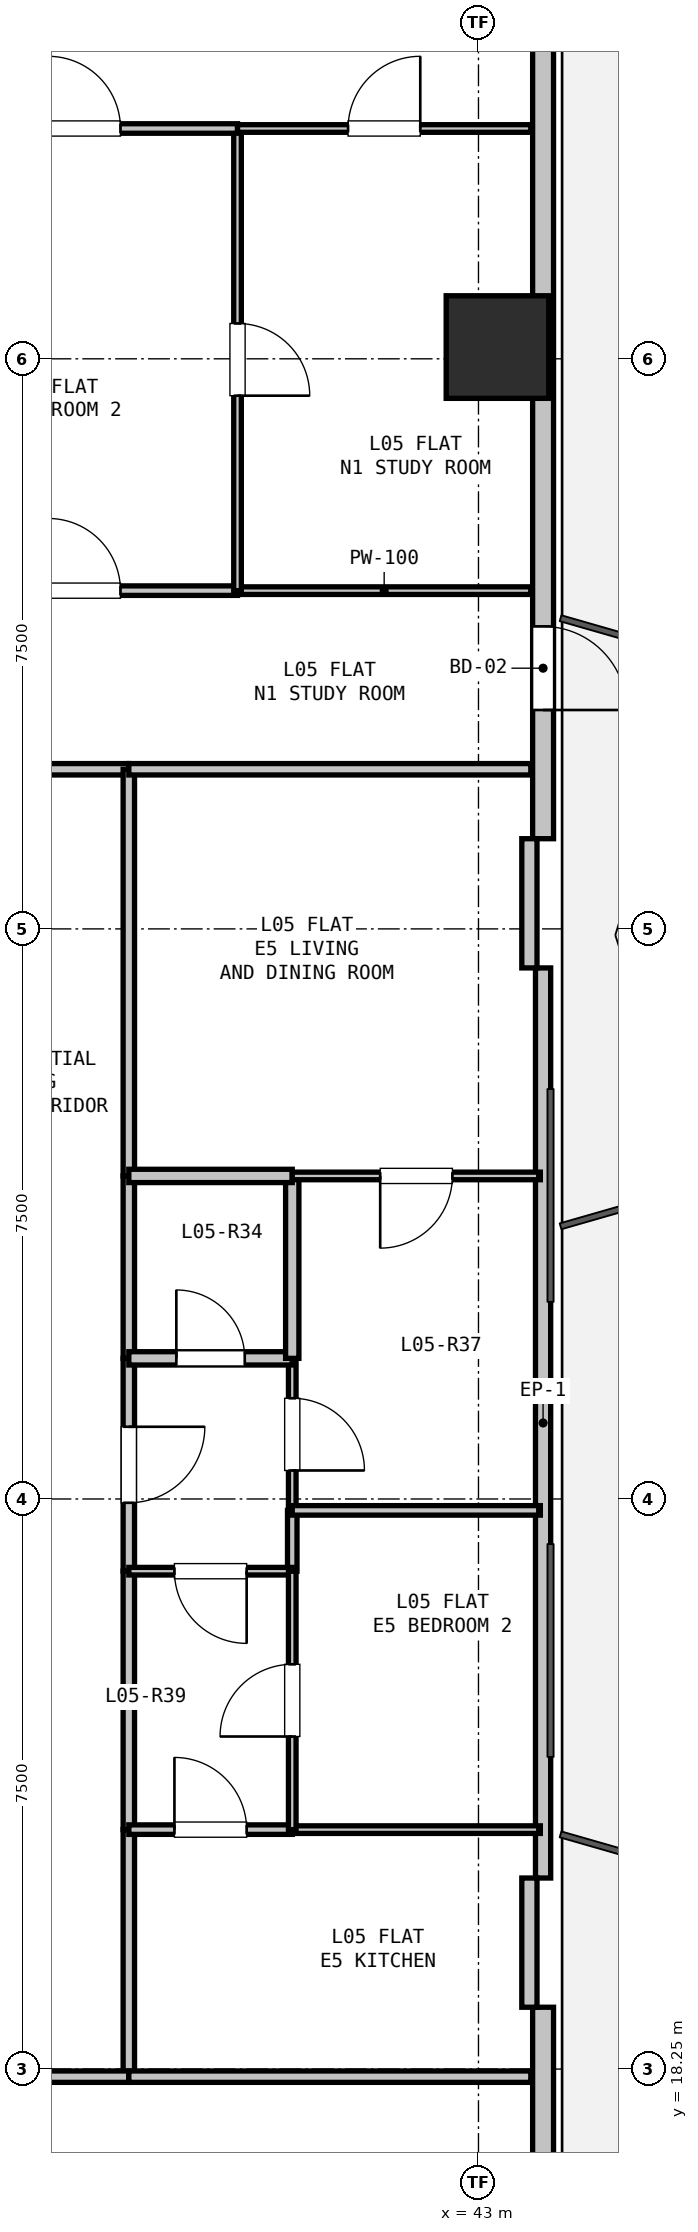
"""IFC4 building model, lengths in metres.
Left out: names, types, materials, properties, quantities, classifications, styles, units other than length and angle.
Written with IfcOpenShell. Run it as: python <this file> out.ifc"""

import sys

from ifc_helpers import new_model, si_unit, direction, frame, frame_2d, origin, origin_2d, place, context, subcontext, project, spatial, rectangle, hollow_rectangle, extrude, element, fill, save


model = new_model("IFC4")
c1 = context("Model", 3, precision=1e-05, world=origin(), true_north=direction((0.0, 1.0)))
c2 = subcontext(c1, "Body", "Model", "MODEL_VIEW")
j1 = project(units=[si_unit("LENGTHUNIT", "METRE"), si_unit("PLANEANGLEUNIT", "RADIAN")], contexts=[c1])
p1 = place(None, origin())
s1 = spatial("IfcSite", under=j1, at=p1, CompositionType="ELEMENT")
p2 = place(p1, origin())
s2 = spatial("IfcBuilding", under=s1, at=p2, CompositionType="ELEMENT")
p3 = place(p2, frame((0.0, 0.0, 22.5)))
s3 = spatial("IfcBuildingStorey", under=s2, at=p3, CompositionType="ELEMENT", Elevation=22.5)
p4 = place(p3, frame((43.25, 40.905, 0.0), z_axis=(0.0, 0.0, 1.0), x_axis=(1.0, 0.0, 0.0)))
e1 = element("IfcColumn", 1, at=p4, inside=s3, PredefinedType="COLUMN", context=c2, shape_type="SweptSolid", body=[
    extrude(hollow_rectangle(XDim=1.35, YDim=1.35, WallThickness=0.036, at=origin_2d()), origin(), (0.0, 0.0, 1.0), 3.3),
])
p5 = place(p3, frame((28.232, 43.454, 0.0), z_axis=(0.0, 0.0, 1.0), x_axis=(0.86603192154, 0.499988710747, 0.0)))
e2 = element("IfcWall", 2, at=p5, inside=s3, PredefinedType="SOLIDWALL", context=c2, shape_type="SweptSolid", body=[
    extrude(rectangle(XDim=12.673, YDim=0.275, at=frame_2d((6.336, 0.0))), origin(), (0.0, 0.0, 1.0), 2.66),
])
p6 = place(p5, frame((4.68, 0.0, 0.9)))
e3 = element("IfcOpeningElement", 3, at=p6, cuts=e2, PredefinedType="OPENING", context=c2, shape_type="SweptSolid", body=[
    extrude(rectangle(XDim=1.2, YDim=1.4, at=frame_2d((0.6, 0.7))), frame((0.0, 0.147, 0.0), z_axis=(0.0, -1.0, 0.0), x_axis=(1.0, 0.0, 0.0)), (0.0, 0.0, 1.0), 0.295),
])
p7 = place(p3, frame((43.85, 47.11, 0.0), z_axis=(0.0, 0.0, 1.0), x_axis=(0.0, -1.0, 0.0)))
e4 = element("IfcWall", 4, at=p7, inside=s3, PredefinedType="SOLIDWALL", context=c2, shape_type="SweptSolid", body=[
    extrude(rectangle(XDim=12.673, YDim=0.275, at=frame_2d((6.336, 0.0))), origin(), (0.0, 0.0, 1.0), 2.66),
])
p8 = place(p7, frame((9.88, 0.0, 0.0)))
e5 = element("IfcOpeningElement", 5, at=p8, cuts=e4, PredefinedType="OPENING", context=c2, shape_type="SweptSolid", body=[
    extrude(rectangle(XDim=1.1, YDim=2.1, at=frame_2d((0.55, 1.05))), frame((0.0, 0.147, 0.0), z_axis=(0.0, -1.0, 0.0), x_axis=(1.0, 0.0, 0.0)), (0.0, 0.0, 1.0), 0.295),
])
p9 = place(p3, frame((43.85, 32.737, 0.0), z_axis=(0.0, 0.0, 1.0), x_axis=(0.0, -1.0, 0.0)))
e6 = element("IfcWall", 6, at=p9, inside=s3, PredefinedType="PARAPET", context=c2, shape_type="SweptSolid", body=[
    extrude(rectangle(XDim=11.973, YDim=0.2, at=frame_2d((5.987, 0.0))), origin(), (0.0, 0.0, 1.0), 0.2),
])
p10 = place(p3, frame((43.85, 19.063, 0.0), z_axis=(0.0, 0.0, 1.0), x_axis=(0.0, -1.0, 0.0)))
e7 = element("IfcWall", 7, at=p10, inside=s3, PredefinedType="SOLIDWALL", context=c2, shape_type="SweptSolid", body=[
    extrude(rectangle(XDim=12.673, YDim=0.275, at=frame_2d((6.336, 0.0))), origin(), (0.0, 0.0, 1.0), 2.66),
])
for number, where, z_axis, x_axis in (
    (8, (43.67, 34.437, 0.0), (0.0, 0.0, 1.0), (0.0, -1.0, 0.0)),
    (9, (43.67, 20.763, 0.0), (0.0, 0.0, 1.0), (0.0, -1.0, 0.0)),
):
    element("IfcWall", number, at=place(p3, frame(where, z_axis=z_axis, x_axis=x_axis)), inside=s3, PredefinedType="PARAPET", context=c2, shape_type="SweptSolid", body=[
        extrude(rectangle(XDim=1.7, YDim=0.2, at=frame_2d((0.85, 0.0))), origin(), (0.0, 0.0, 1.0), 2.66),
    ])
p11 = place(p3, frame((35.8, 35.35, 0.0), z_axis=(0.0, 0.0, 1.0), x_axis=(1.0, 0.0, 0.0)))
e10 = element("IfcWall", 10, at=p11, inside=s3, PredefinedType="PARTITIONING", context=c2, shape_type="SweptSolid", body=[
    extrude(rectangle(XDim=2.6, YDim=0.15, at=frame_2d((1.3, 0.0))), origin(), (0.0, 0.0, 1.0), 2.337),
])
p12 = place(p3, frame((38.4, 35.35, 0.0), z_axis=(0.0, 0.0, 1.0), x_axis=(0.0, -1.0, 0.0)))
e11 = element("IfcWall", 11, at=p12, inside=s3, PredefinedType="PARTITIONING", context=c2, shape_type="SweptSolid", body=[
    extrude(rectangle(XDim=5.35, YDim=0.15, at=frame_2d((2.675, 0.0))), origin(), (0.0, 0.0, 1.0), 2.337),
])
p13 = place(p3, frame((38.4, 30.0, 0.0), z_axis=(0.0, 0.0, 1.0), x_axis=(0.0, -1.0, 0.0)))
e12 = element("IfcWall", 12, at=p13, inside=s3, PredefinedType="PARTITIONING", context=c2, shape_type="SweptSolid", body=[
    extrude(rectangle(XDim=2.4, YDim=0.15, at=frame_2d((1.2, 0.0))), origin(), (0.0, 0.0, 1.0), 3.04),
])
p14 = place(p3, frame((38.4, 27.6, 0.0), z_axis=(0.0, 0.0, 1.0), x_axis=(0.0, -1.0, 0.0)))
e13 = element("IfcWall", 13, at=p14, inside=s3, PredefinedType="PARTITIONING", context=c2, shape_type="SweptSolid", body=[
    extrude(rectangle(XDim=2.8, YDim=0.15, at=frame_2d((1.4, 0.0))), origin(), (0.0, 0.0, 1.0), 3.04),
])
p15 = place(p14, frame((0.9, 0.0, 0.0)))
e14 = element("IfcOpeningElement", 14, at=p15, cuts=e13, PredefinedType="OPENING", context=c2, shape_type="SweptSolid", body=[
    extrude(rectangle(XDim=1.0, YDim=2.15, at=frame_2d((0.5, 1.075))), frame((0.0, 0.085, 0.0), z_axis=(0.0, -1.0, 0.0), x_axis=(1.0, 0.0, 0.0)), (0.0, 0.0, 1.0), 0.17),
])
p16 = place(p3, frame((38.4, 24.8, 0.0), z_axis=(0.0, 0.0, 1.0), x_axis=(0.0, -1.0, 0.0)))
e15 = element("IfcWall", 15, at=p16, inside=s3, PredefinedType="PARTITIONING", context=c2, shape_type="SweptSolid", body=[
    extrude(rectangle(XDim=3.4, YDim=0.15, at=frame_2d((1.7, 0.0))), origin(), (0.0, 0.0, 1.0), 3.04),
])
p17 = place(p3, frame((38.4, 21.4, 0.0), z_axis=(0.0, 0.0, 1.0), x_axis=(0.0, -1.0, 0.0)))
e16 = element("IfcWall", 16, at=p17, inside=s3, PredefinedType="PARTITIONING", context=c2, shape_type="SweptSolid", body=[
    extrude(rectangle(XDim=3.25, YDim=0.15, at=frame_2d((1.625, 0.0))), origin(), (0.0, 0.0, 1.0), 3.04),
])
p18 = place(p3, frame((38.4, 18.15, 0.0), z_axis=(0.0, 0.0, 1.0), x_axis=(-1.0, 0.0, 0.0)))
e17 = element("IfcWall", 17, at=p18, inside=s3, PredefinedType="PARTITIONING", context=c2, shape_type="SweptSolid", body=[
    extrude(rectangle(XDim=2.6, YDim=0.15, at=frame_2d((1.3, 0.0))), origin(), (0.0, 0.0, 1.0), 2.337),
])
p19 = place(p3, frame((40.55, 27.6, 0.0), z_axis=(0.0, 0.0, 1.0), x_axis=(0.0, -1.0, 0.0)))
e18 = element("IfcWall", 18, at=p19, inside=s3, PredefinedType="PARTITIONING", context=c2, shape_type="SweptSolid", body=[
    extrude(rectangle(XDim=2.0, YDim=0.1, at=frame_2d((1.0, 0.0))), origin(), (0.0, 0.0, 1.0), 3.04),
])
p20 = place(p19, frame((0.525, 0.0, 0.0)))
e19 = element("IfcOpeningElement", 19, at=p20, cuts=e18, PredefinedType="OPENING", context=c2, shape_type="SweptSolid", body=[
    extrude(rectangle(XDim=0.95, YDim=2.1, at=frame_2d((0.475, 1.05))), frame((0.0, 0.06, 0.0), z_axis=(0.0, -1.0, 0.0), x_axis=(1.0, 0.0, 0.0)), (0.0, 0.0, 1.0), 0.12),
])
p21 = place(p3, frame((40.55, 25.6, 0.0), z_axis=(0.0, 0.0, 1.0), x_axis=(0.0, -1.0, 0.0)))
e20 = element("IfcWall", 20, at=p21, inside=s3, PredefinedType="PARTITIONING", context=c2, shape_type="SweptSolid", body=[
    extrude(rectangle(XDim=0.8, YDim=0.125, at=frame_2d((0.4, 0.0))), origin(), (0.0, 0.0, 1.0), 3.04),
])
p22 = place(p3, frame((40.55, 24.8, 0.0), z_axis=(0.0, 0.0, 1.0), x_axis=(-1.0, 0.0, 0.0)))
e21 = element("IfcWall", 21, at=p22, inside=s3, PredefinedType="PARTITIONING", context=c2, shape_type="SweptSolid", body=[
    extrude(rectangle(XDim=2.15, YDim=0.1, at=frame_2d((1.075, 0.0))), origin(), (0.0, 0.0, 1.0), 3.04),
])
p23 = place(p22, frame((0.6, 0.0, 0.0)))
e22 = element("IfcOpeningElement", 22, at=p23, cuts=e21, PredefinedType="OPENING", context=c2, shape_type="SweptSolid", body=[
    extrude(rectangle(XDim=0.95, YDim=2.1, at=frame_2d((0.475, 1.05))), frame((0.0, 0.06, 0.0), z_axis=(0.0, -1.0, 0.0), x_axis=(1.0, 0.0, 0.0)), (0.0, 0.0, 1.0), 0.12),
])
p24 = place(p3, frame((38.4, 27.6, 0.0), z_axis=(0.0, 0.0, 1.0), x_axis=(1.0, 0.0, 0.0)))
e23 = element("IfcWall", 23, at=p24, inside=s3, PredefinedType="PLUMBINGWALL", context=c2, shape_type="SweptSolid", body=[
    extrude(rectangle(XDim=2.15, YDim=0.175, at=frame_2d((1.075, 0.0))), origin(), (0.0, 0.0, 1.0), 3.04),
])
p25 = place(p24, frame((0.625, 0.0, 0.0)))
e24 = element("IfcOpeningElement", 24, at=p25, cuts=e23, PredefinedType="OPENING", context=c2, shape_type="SweptSolid", body=[
    extrude(rectangle(XDim=0.9, YDim=2.1, at=frame_2d((0.45, 1.05))), frame((0.0, 0.097, 0.0), z_axis=(0.0, -1.0, 0.0), x_axis=(1.0, 0.0, 0.0)), (0.0, 0.0, 1.0), 0.195),
])
p26 = place(p3, frame((38.4, 18.15, 0.0), z_axis=(0.0, 0.0, 1.0), x_axis=(1.0, 0.0, 0.0)))
e25 = element("IfcWall", 25, at=p26, inside=s3, PredefinedType="PARTITIONING", context=c2, shape_type="SweptSolid", body=[
    extrude(rectangle(XDim=5.289, YDim=0.15, at=frame_2d((2.644, 0.0))), origin(), (0.0, 0.0, 1.0), 2.365),
])
p27 = place(p3, frame((40.55, 30.0, 0.0), z_axis=(0.0, 0.0, 1.0), x_axis=(0.0, -1.0, 0.0)))
e26 = element("IfcWall", 26, at=p27, inside=s3, PredefinedType="PLUMBINGWALL", context=c2, shape_type="SweptSolid", body=[
    extrude(rectangle(XDim=2.4, YDim=0.175, at=frame_2d((1.2, 0.0))), origin(), (0.0, 0.0, 1.0), 3.04),
])
p28 = place(p3, frame((38.4, 30.0, 0.0), z_axis=(0.0, 0.0, 1.0), x_axis=(1.0, 0.0, 0.0)))
e27 = element("IfcWall", 27, at=p28, inside=s3, PredefinedType="PLUMBINGWALL", context=c2, shape_type="SweptSolid", body=[
    extrude(rectangle(XDim=2.15, YDim=0.175, at=frame_2d((1.075, 0.0))), origin(), (0.0, 0.0, 1.0), 3.04),
])
p29 = place(p3, frame((38.4, 21.4, 0.0), z_axis=(0.0, 0.0, 1.0), x_axis=(1.0, 0.0, 0.0)))
e28 = element("IfcWall", 28, at=p29, inside=s3, PredefinedType="PARTITIONING", context=c2, shape_type="SweptSolid", body=[
    extrude(rectangle(XDim=2.15, YDim=0.125, at=frame_2d((1.075, 0.0))), origin(), (0.0, 0.0, 1.0), 3.04),
])
p30 = place(p29, frame((0.6, 0.0, 0.0)))
e29 = element("IfcOpeningElement", 29, at=p30, cuts=e28, PredefinedType="OPENING", context=c2, shape_type="SweptSolid", body=[
    extrude(rectangle(XDim=0.95, YDim=2.1, at=frame_2d((0.475, 1.05))), frame((0.0, 0.073, 0.0), z_axis=(0.0, -1.0, 0.0), x_axis=(1.0, 0.0, 0.0)), (0.0, 0.0, 1.0), 0.145),
])
p31 = place(p3, frame((40.55, 21.4, 0.0), z_axis=(0.0, 0.0, 1.0), x_axis=(1.0, 0.0, 0.0)))
e30 = element("IfcWall", 30, at=p31, inside=s3, PredefinedType="PARTITIONING", context=c2, shape_type="SweptSolid", body=[
    extrude(rectangle(XDim=3.264, YDim=0.1, at=frame_2d((1.632, 0.0))), origin(), (0.0, 0.0, 1.0), 2.365),
])
p32 = place(p3, frame((43.688, 35.35, 0.0), z_axis=(0.0, 0.0, 1.0), x_axis=(-1.0, 0.0, 0.0)))
e31 = element("IfcWall", 31, at=p32, inside=s3, PredefinedType="PARTITIONING", context=c2, shape_type="SweptSolid", body=[
    extrude(rectangle(XDim=5.289, YDim=0.15, at=frame_2d((2.644, 0.0))), origin(), (0.0, 0.0, 1.0), 2.337),
])
p33 = place(p3, frame((35.8, 37.7, 0.0), z_axis=(0.0, 0.0, 1.0), x_axis=(1.0, 0.0, 0.0)))
e32 = element("IfcWall", 32, at=p33, inside=s3, PredefinedType="PARTITIONING", context=c2, shape_type="SweptSolid", body=[
    extrude(rectangle(XDim=4.03, YDim=0.125, at=frame_2d((2.015, 0.0))), origin(), (0.0, 0.0, 1.0), 2.337),
])
p34 = place(p33, frame((1.54, 0.0, 0.0)))
e33 = element("IfcOpeningElement", 33, at=p34, cuts=e32, PredefinedType="OPENING", context=c2, shape_type="SweptSolid", body=[
    extrude(rectangle(XDim=0.95, YDim=2.1, at=frame_2d((0.475, 1.05))), frame((0.0, 0.073, 0.0), z_axis=(0.0, -1.0, 0.0), x_axis=(1.0, 0.0, 0.0)), (0.0, 0.0, 1.0), 0.145),
])
p35 = place(p3, frame((39.83, 37.7, 0.0), z_axis=(0.0, 0.0, 1.0), x_axis=(1.0, 0.0, 0.0)))
e34 = element("IfcWall", 34, at=p35, inside=s3, PredefinedType="PARTITIONING", context=c2, shape_type="SweptSolid", body=[
    extrude(rectangle(XDim=3.858, YDim=0.1, at=frame_2d((1.929, 0.0))), origin(), (0.0, 0.0, 1.0), 2.337),
])
p36 = place(p3, frame((39.83, 43.78, 0.0), z_axis=(0.0, 0.0, 1.0), x_axis=(0.0, -1.0, 0.0)))
e35 = element("IfcWall", 35, at=p36, inside=s3, PredefinedType="PARTITIONING", context=c2, shape_type="SweptSolid", body=[
    extrude(rectangle(XDim=6.08, YDim=0.1, at=frame_2d((3.04, 0.0))), origin(), (0.0, 0.0, 1.0), 3.04),
])
p37 = place(p36, frame((2.565, 0.0, 0.0)))
e36 = element("IfcOpeningElement", 36, at=p37, cuts=e35, PredefinedType="OPENING", context=c2, shape_type="SweptSolid", body=[
    extrude(rectangle(XDim=0.95, YDim=2.1, at=frame_2d((0.475, 1.05))), frame((0.0, 0.06, 0.0), z_axis=(0.0, -1.0, 0.0), x_axis=(1.0, 0.0, 0.0)), (0.0, 0.0, 1.0), 0.12),
])
p38 = place(p3, frame((35.8, 43.78, 0.0), z_axis=(0.0, 0.0, 1.0), x_axis=(1.0, 0.0, 0.0)))
e37 = element("IfcWall", 37, at=p38, inside=s3, PredefinedType="PARTITIONING", context=c2, shape_type="SweptSolid", body=[
    extrude(rectangle(XDim=4.03, YDim=0.125, at=frame_2d((2.015, 0.0))), origin(), (0.0, 0.0, 1.0), 2.337),
])
p39 = place(p38, frame((1.54, 0.0, 0.0)))
e38 = element("IfcOpeningElement", 38, at=p39, cuts=e37, PredefinedType="OPENING", context=c2, shape_type="SweptSolid", body=[
    extrude(rectangle(XDim=0.95, YDim=2.1, at=frame_2d((0.475, 1.05))), frame((0.0, 0.073, 0.0), z_axis=(0.0, -1.0, 0.0), x_axis=(1.0, 0.0, 0.0)), (0.0, 0.0, 1.0), 0.145),
])
p40 = place(p3, frame((39.83, 43.78, 0.0), z_axis=(0.0, 0.0, 1.0), x_axis=(1.0, 0.0, 0.0)))
e39 = element("IfcWall", 39, at=p40, inside=s3, PredefinedType="PARTITIONING", context=c2, shape_type="SweptSolid", body=[
    extrude(rectangle(XDim=3.858, YDim=0.1, at=frame_2d((1.929, 0.0))), origin(), (0.0, 0.0, 1.0), 2.65),
])
p41 = place(p40, frame((1.454, 0.0, 0.0)))
e40 = element("IfcOpeningElement", 40, at=p41, cuts=e39, PredefinedType="OPENING", context=c2, shape_type="SweptSolid", body=[
    extrude(rectangle(XDim=0.95, YDim=2.1, at=frame_2d((0.475, 1.05))), frame((0.0, 0.06, 0.0), z_axis=(0.0, -1.0, 0.0), x_axis=(1.0, 0.0, 0.0)), (0.0, 0.0, 1.0), 0.12),
])
p42 = place(p3, frame((43.814, 30.0, 0.0), z_axis=(0.0, 0.0, 1.0), x_axis=(-1.0, 0.0, 0.0)))
e41 = element("IfcWall", 41, at=p42, inside=s3, PredefinedType="PARTITIONING", context=c2, shape_type="SweptSolid", body=[
    extrude(rectangle(XDim=3.264, YDim=0.1, at=frame_2d((1.632, 0.0))), origin(), (0.0, 0.0, 1.0), 2.365),
])
p43 = place(p42, frame((1.157, 0.0, 0.0)))
e42 = element("IfcOpeningElement", 42, at=p43, cuts=e41, PredefinedType="OPENING", context=c2, shape_type="SweptSolid", body=[
    extrude(rectangle(XDim=0.95, YDim=2.1, at=frame_2d((0.475, 1.05))), frame((0.0, 0.06, 0.0), z_axis=(0.0, -1.0, 0.0), x_axis=(1.0, 0.0, 0.0)), (0.0, 0.0, 1.0), 0.12),
])
p44 = place(p3, frame((43.814, 25.6, 0.0), z_axis=(0.0, 0.0, 1.0), x_axis=(-1.0, 0.0, 0.0)))
e43 = element("IfcWall", 43, at=p44, inside=s3, PredefinedType="PARTITIONING", context=c2, shape_type="SweptSolid", body=[
    extrude(rectangle(XDim=3.264, YDim=0.125, at=frame_2d((1.632, 0.0))), origin(), (0.0, 0.0, 1.0), 2.365),
])
p45 = place(p3, frame((40.55, 21.4, 0.0), z_axis=(0.0, 0.0, 1.0), x_axis=(0.0, 1.0, 0.0)))
e44 = element("IfcWall", 44, at=p45, inside=s3, PredefinedType="PARTITIONING", context=c2, shape_type="SweptSolid", body=[
    extrude(rectangle(XDim=3.4, YDim=0.1, at=frame_2d((1.7, 0.0))), origin(), (0.0, 0.0, 1.0), 3.04),
])
p46 = place(p45, frame((1.225, 0.0, 0.0)))
e45 = element("IfcOpeningElement", 45, at=p46, cuts=e44, PredefinedType="OPENING", context=c2, shape_type="SweptSolid", body=[
    extrude(rectangle(XDim=0.95, YDim=2.1, at=frame_2d((0.475, 1.05))), frame((0.0, 0.06, 0.0), z_axis=(0.0, -1.0, 0.0), x_axis=(1.0, 0.0, 0.0)), (0.0, 0.0, 1.0), 0.12),
])
p47 = place(p8, origin())
e46 = element("IfcDoor", 46, at=p47, inside=s3, OperationType="SINGLE_SWING_RIGHT", PredefinedType="DOOR", context=c2, shape_type="SweptSolid", body=[
    extrude(rectangle(XDim=1.1, YDim=2.1, at=frame_2d((0.55, 1.05))), frame((0.0, 0.025, 0.0), z_axis=(0.0, -1.0, 0.0), x_axis=(1.0, 0.0, 0.0)), (0.0, 0.0, 1.0), 0.05),
])
fill(e5, e46)
p48 = place(p15, origin())
e47 = element("IfcDoor", 47, at=p48, inside=s3, OperationType="SINGLE_SWING_LEFT", PredefinedType="DOOR", context=c2, shape_type="SweptSolid", body=[
    extrude(rectangle(XDim=1.0, YDim=2.15, at=frame_2d((0.5, 1.075))), frame((0.0, 0.025, 0.0), z_axis=(0.0, -1.0, 0.0), x_axis=(1.0, 0.0, 0.0)), (0.0, 0.0, 1.0), 0.05),
])
fill(e14, e47)
p49 = place(p25, origin())
e48 = element("IfcDoor", 48, at=p49, inside=s3, OperationType="SINGLE_SWING_LEFT", PredefinedType="DOOR", context=c2, shape_type="SweptSolid", body=[
    extrude(rectangle(XDim=0.9, YDim=2.1, at=frame_2d((0.45, 1.05))), frame((0.0, 0.025, 0.0), z_axis=(0.0, -1.0, 0.0), x_axis=(1.0, 0.0, 0.0)), (0.0, 0.0, 1.0), 0.05),
])
fill(e24, e48)
p50 = place(p20, origin())
e49 = element("IfcDoor", 49, at=p50, inside=s3, OperationType="SINGLE_SWING_RIGHT", PredefinedType="DOOR", context=c2, shape_type="SweptSolid", body=[
    extrude(rectangle(XDim=0.95, YDim=2.1, at=frame_2d((0.475, 1.05))), frame((0.0, 0.025, 0.0), z_axis=(0.0, -1.0, 0.0), x_axis=(1.0, 0.0, 0.0)), (0.0, 0.0, 1.0), 0.05),
])
fill(e19, e49)
p51 = place(p23, origin())
e50 = element("IfcDoor", 50, at=p51, inside=s3, OperationType="SINGLE_SWING_LEFT", PredefinedType="DOOR", context=c2, shape_type="SweptSolid", body=[
    extrude(rectangle(XDim=0.95, YDim=2.1, at=frame_2d((0.475, 1.05))), frame((0.0, 0.025, 0.0), z_axis=(0.0, -1.0, 0.0), x_axis=(1.0, 0.0, 0.0)), (0.0, 0.0, 1.0), 0.05),
])
fill(e22, e50)
p52 = place(p30, origin())
e51 = element("IfcDoor", 51, at=p52, inside=s3, OperationType="SINGLE_SWING_LEFT", PredefinedType="DOOR", context=c2, shape_type="SweptSolid", body=[
    extrude(rectangle(XDim=0.95, YDim=2.1, at=frame_2d((0.475, 1.05))), frame((0.0, 0.025, 0.0), z_axis=(0.0, -1.0, 0.0), x_axis=(1.0, 0.0, 0.0)), (0.0, 0.0, 1.0), 0.05),
])
fill(e29, e51)
p53 = place(p34, origin())
e52 = element("IfcDoor", 52, at=p53, inside=s3, OperationType="SINGLE_SWING_LEFT", PredefinedType="DOOR", context=c2, shape_type="SweptSolid", body=[
    extrude(rectangle(XDim=0.95, YDim=2.1, at=frame_2d((0.475, 1.05))), frame((0.0, 0.025, 0.0), z_axis=(0.0, -1.0, 0.0), x_axis=(1.0, 0.0, 0.0)), (0.0, 0.0, 1.0), 0.05),
])
fill(e33, e52)
p54 = place(p37, origin())
e53 = element("IfcDoor", 53, at=p54, inside=s3, OperationType="SINGLE_SWING_RIGHT", PredefinedType="DOOR", context=c2, shape_type="SweptSolid", body=[
    extrude(rectangle(XDim=0.95, YDim=2.1, at=frame_2d((0.475, 1.05))), frame((0.0, 0.025, 0.0), z_axis=(0.0, -1.0, 0.0), x_axis=(1.0, 0.0, 0.0)), (0.0, 0.0, 1.0), 0.05),
])
fill(e36, e53)
p55 = place(p39, origin())
e54 = element("IfcDoor", 54, at=p55, inside=s3, OperationType="SINGLE_SWING_LEFT", PredefinedType="DOOR", context=c2, shape_type="SweptSolid", body=[
    extrude(rectangle(XDim=0.95, YDim=2.1, at=frame_2d((0.475, 1.05))), frame((0.0, 0.025, 0.0), z_axis=(0.0, -1.0, 0.0), x_axis=(1.0, 0.0, 0.0)), (0.0, 0.0, 1.0), 0.05),
])
fill(e38, e54)
p56 = place(p41, origin())
e55 = element("IfcDoor", 55, at=p56, inside=s3, OperationType="SINGLE_SWING_RIGHT", PredefinedType="DOOR", context=c2, shape_type="SweptSolid", body=[
    extrude(rectangle(XDim=0.95, YDim=2.1, at=frame_2d((0.475, 1.05))), frame((0.0, 0.025, 0.0), z_axis=(0.0, -1.0, 0.0), x_axis=(1.0, 0.0, 0.0)), (0.0, 0.0, 1.0), 0.05),
])
fill(e40, e55)
p57 = place(p43, origin())
e56 = element("IfcDoor", 56, at=p57, inside=s3, OperationType="SINGLE_SWING_RIGHT", PredefinedType="DOOR", context=c2, shape_type="SweptSolid", body=[
    extrude(rectangle(XDim=0.95, YDim=2.1, at=frame_2d((0.475, 1.05))), frame((0.0, 0.025, 0.0), z_axis=(0.0, -1.0, 0.0), x_axis=(1.0, 0.0, 0.0)), (0.0, 0.0, 1.0), 0.05),
])
fill(e42, e56)
p58 = place(p46, origin())
e57 = element("IfcDoor", 57, at=p58, inside=s3, OperationType="SINGLE_SWING_LEFT", PredefinedType="DOOR", context=c2, shape_type="SweptSolid", body=[
    extrude(rectangle(XDim=0.95, YDim=2.1, at=frame_2d((0.475, 1.05))), frame((0.0, 0.025, 0.0), z_axis=(0.0, -1.0, 0.0), x_axis=(1.0, 0.0, 0.0)), (0.0, 0.0, 1.0), 0.05),
])
fill(e45, e57)
save(model, sys.argv[1])
